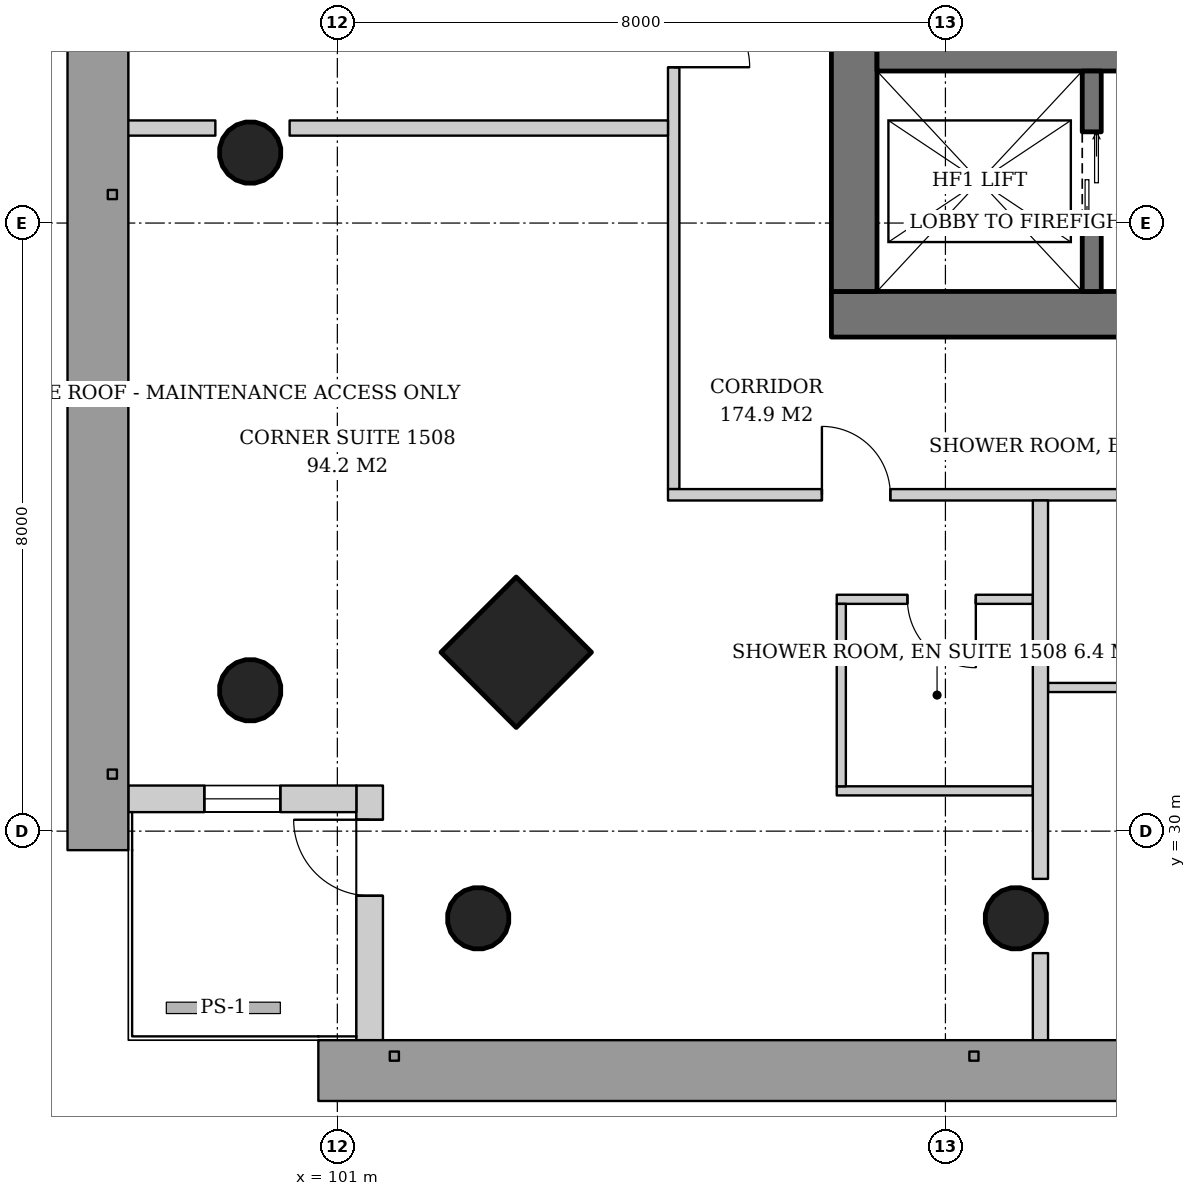
"""IFC4 building model, lengths in metres.
Left out: names, types, materials, properties, quantities, classifications, styles, units other than length and angle.
Written with IfcOpenShell. Run it as: python <this file> out.ifc"""

import sys

from ifc_helpers import new_model, si_unit, direction, frame, frame_2d, origin, origin_2d, place, context, subcontext, project, spatial, rectangle, hollow_circle, extrude, element, fill, save


model = new_model("IFC4")
c1 = context("Model", 3, precision=1e-05, world=origin(), true_north=direction((0.0, 1.0)))
c2 = subcontext(c1, "Body", "Model", "MODEL_VIEW")
j1 = project(units=[si_unit("LENGTHUNIT", "METRE"), si_unit("PLANEANGLEUNIT", "RADIAN")], contexts=[c1])
p1 = place(None, origin())
s1 = spatial("IfcSite", under=j1, at=p1, CompositionType="ELEMENT")
p2 = place(p1, origin())
s2 = spatial("IfcBuilding", under=s1, at=p2, CompositionType="ELEMENT")
p3 = place(p2, frame((0.0, 0.0, 62.8)))
s3 = spatial("IfcBuildingStorey", under=s2, at=p3, CompositionType="ELEMENT", Elevation=62.8)
p4 = place(p3, frame((103.302, 32.302, 0.0), z_axis=(0.043029647111, 0.043029647111, 0.998146732169), x_axis=(-0.707106781187, 0.707106781187, 0.0)))
e1 = element("IfcColumn", 1, at=p4, inside=s3, PredefinedType="COLUMN", context=c2, shape_type="SweptSolid", body=[
    extrude(rectangle(XDim=1.4, YDim=1.4, at=origin_2d()), origin(), (0.0, 0.0, 1.0), 3.807),
])
p5 = place(p3, frame((99.802, 31.802, 0.0), z_axis=(0.043029647111, 0.043029647111, 0.998146732169), x_axis=(-0.707106781187, 0.707106781187, 0.0)))
e2 = element("IfcColumn", 2, at=p5, inside=s3, PredefinedType="COLUMN", context=c2, shape_type="SweptSolid", body=[
    extrude(hollow_circle(Radius=0.406, WallThickness=0.03, at=origin_2d()), origin(), (0.0, 0.0, 1.0), 3.807),
])
p6 = place(p3, frame((99.802, 38.901, 0.0), z_axis=(0.043059584825, 0.021497706284, 0.998841188968), x_axis=(-0.446680166538, 0.894693706707, 0.0)))
e3 = element("IfcColumn", 3, at=p6, inside=s3, PredefinedType="COLUMN", context=c2, shape_type="SweptSolid", body=[
    extrude(hollow_circle(Radius=0.406, WallThickness=0.03, at=origin_2d()), origin(), (0.0, 0.0, 1.0), 3.804),
])
p7 = place(p3, frame((102.802, 28.802, 0.0), z_axis=(0.043029647111, 0.043029647111, 0.998146732169), x_axis=(-0.707106781187, 0.707106781187, 0.0)))
e4 = element("IfcColumn", 4, at=p7, inside=s3, PredefinedType="COLUMN", context=c2, shape_type="SweptSolid", body=[
    extrude(hollow_circle(Radius=0.406, WallThickness=0.03, at=origin_2d()), origin(), (0.0, 0.0, 1.0), 3.807),
])
p8 = place(p3, frame((109.901, 28.802, 0.0), z_axis=(0.021497706284, 0.043059584825, 0.998841188968), x_axis=(-0.894693706707, 0.446680166538, 0.0)))
e5 = element("IfcColumn", 5, at=p8, inside=s3, PredefinedType="COLUMN", context=c2, shape_type="SweptSolid", body=[
    extrude(hollow_circle(Radius=0.406, WallThickness=0.03, at=origin_2d()), origin(), (0.0, 0.0, 1.0), 3.804),
])
p9 = place(p3, frame((107.5, 36.8, 0.0), z_axis=(0.0, 0.0, 1.0), x_axis=(1.0, 0.0, 0.0)))
e6 = element("IfcWall", 6, at=p9, inside=s3, PredefinedType="SHEAR", context=c2, shape_type="SweptSolid", body=[
    extrude(rectangle(XDim=19.0, YDim=0.6, at=frame_2d((9.5, 0.0))), origin(), (0.0, 0.0, 1.0), 3.8),
])
p10 = place(p9, frame((3.9, 0.0, 0.0)))
e7 = element("IfcOpeningElement", 7, at=p10, cuts=e6, PredefinedType="OPENING", context=c2, shape_type="SweptSolid", body=[
    extrude(rectangle(XDim=1.0, YDim=2.1, at=frame_2d((0.5, 1.05))), frame((0.0, 0.31, 0.0), z_axis=(0.0, -1.0, 0.0), x_axis=(1.0, 0.0, 0.0)), (0.0, 0.0, 1.0), 0.62),
])
p11 = place(p9, frame((15.615, 0.0, 0.0)))
e8 = element("IfcOpeningElement", 8, at=p11, cuts=e6, PredefinedType="OPENING", context=c2, shape_type="SweptSolid", body=[
    extrude(rectangle(XDim=1.0, YDim=2.1, at=frame_2d((0.5, 1.05))), frame((0.0, 0.31, 0.0), z_axis=(0.0, -1.0, 0.0), x_axis=(1.0, 0.0, 0.0)), (0.0, 0.0, 1.0), 0.62),
])
p12 = place(p3, frame((107.8, 37.1, 0.0), z_axis=(0.0, 0.0, 1.0), x_axis=(0.0, 1.0, 0.0)))
e9 = element("IfcWall", 9, at=p12, inside=s3, PredefinedType="SHEAR", context=c2, shape_type="SweptSolid", body=[
    extrude(rectangle(XDim=17.8, YDim=0.6, at=frame_2d((8.9, 0.0))), origin(), (0.0, 0.0, 1.0), 3.8),
])
p13 = place(p12, frame((8.0, 0.0, 0.0)))
e10 = element("IfcOpeningElement", 10, at=p13, cuts=e9, PredefinedType="OPENING", context=c2, shape_type="SweptSolid", body=[
    extrude(rectangle(XDim=1.8, YDim=2.4, at=frame_2d((0.9, 1.2))), frame((0.0, 0.31, 0.0), z_axis=(0.0, -1.0, 0.0), x_axis=(1.0, 0.0, 0.0)), (0.0, 0.0, 1.0), 0.62),
])
p14 = place(p3, frame((108.1, 40.2, 0.0), z_axis=(0.0, 0.0, 1.0), x_axis=(1.0, 0.0, 0.0)))
e11 = element("IfcWall", 11, at=p14, inside=s3, PredefinedType="SHEAR", context=c2, shape_type="SweptSolid", body=[
    extrude(rectangle(XDim=17.8, YDim=0.4, at=frame_2d((8.9, 0.0))), origin(), (0.0, 0.0, 1.0), 3.8),
])
p15 = place(p3, frame((101.425, 27.25, 0.0), z_axis=(0.0, 0.0, 1.0), x_axis=(0.0, 1.0, 0.0)))
e12 = element("IfcWall", 12, at=p15, inside=s3, PredefinedType="SOLIDWALL", context=c2, shape_type="SweptSolid", body=[
    extrude(rectangle(XDim=3.35, YDim=0.35, at=frame_2d((1.675, 0.0))), origin(), (0.0, 0.0, 1.0), 3.6),
])
p16 = place(p15, frame((1.9, 0.0, 0.0)))
e13 = element("IfcOpeningElement", 13, at=p16, cuts=e12, PredefinedType="OPENING", context=c2, shape_type="SweptSolid", body=[
    extrude(rectangle(XDim=1.0, YDim=2.4, at=frame_2d((0.5, 1.2))), frame((0.0, 0.185, 0.0), z_axis=(0.0, -1.0, 0.0), x_axis=(1.0, 0.0, 0.0)), (0.0, 0.0, 1.0), 0.37),
])
p17 = place(p3, frame((101.25, 30.425, 0.0), z_axis=(0.0, 0.0, 1.0), x_axis=(-1.0, 0.0, 0.0)))
e14 = element("IfcWall", 14, at=p17, inside=s3, PredefinedType="SOLIDWALL", context=c2, shape_type="SweptSolid", body=[
    extrude(rectangle(XDim=3.0, YDim=0.35, at=frame_2d((1.5, 0.0))), origin(), (0.0, 0.0, 1.0), 3.6),
])
p18 = place(p17, frame((1.0, 0.0, 0.9)))
e15 = element("IfcOpeningElement", 15, at=p18, cuts=e14, PredefinedType="OPENING", context=c2, shape_type="SweptSolid", body=[
    extrude(rectangle(XDim=1.0, YDim=2.4, at=frame_2d((0.5, 1.2))), frame((0.0, 0.185, 0.0), z_axis=(0.0, -1.0, 0.0), x_axis=(1.0, 0.0, 0.0)), (0.0, 0.0, 1.0), 0.37),
])
p19 = place(p3, frame((110.925, 37.1, 0.0), z_axis=(0.0, 0.0, 1.0), x_axis=(0.0, 1.0, 0.0)))
e16 = element("IfcWall", 16, at=p19, inside=s3, PredefinedType="SHEAR", context=c2, shape_type="SweptSolid", body=[
    extrude(rectangle(XDim=2.9, YDim=0.25, at=frame_2d((1.45, 0.0))), origin(), (0.0, 0.0, 1.0), 3.8),
])
p20 = place(p19, frame((0.8, 0.0, 0.0)))
e17 = element("IfcOpeningElement", 17, at=p20, cuts=e16, PredefinedType="OPENING", context=c2, shape_type="SweptSolid", body=[
    extrude(rectangle(XDim=1.3, YDim=2.2, at=frame_2d((0.65, 1.1))), frame((0.0, 0.135, 0.0), z_axis=(0.0, -1.0, 0.0), x_axis=(1.0, 0.0, 0.0)), (0.0, 0.0, 1.0), 0.27),
])
p21 = place(p3, frame((105.425, 57.65, 0.0), z_axis=(0.0, 0.0, 1.0), x_axis=(0.0, -1.0, 0.0)))
e18 = element("IfcWall", 18, at=p21, inside=s3, PredefinedType="PARTITIONING", context=c2, shape_type="SweptSolid", body=[
    extrude(rectangle(XDim=23.15, YDim=0.15, at=frame_2d((11.575, 0.0))), origin(), (0.0, 0.0, 1.0), 2.8),
])
p22 = place(p21, frame((1.975, 0.0, 0.0)))
e19 = element("IfcOpeningElement", 19, at=p22, cuts=e18, PredefinedType="OPENING", context=c2, shape_type="SweptSolid", body=[
    extrude(rectangle(XDim=1.0, YDim=2.1, at=frame_2d((0.5, 1.05))), frame((0.0, 0.085, 0.0), z_axis=(0.0, -1.0, 0.0), x_axis=(1.0, 0.0, 0.0)), (0.0, 0.0, 1.0), 0.17),
])
p23 = place(p21, frame((7.65, 0.0, 0.0)))
e20 = element("IfcOpeningElement", 20, at=p23, cuts=e18, PredefinedType="OPENING", context=c2, shape_type="SweptSolid", body=[
    extrude(rectangle(XDim=0.9, YDim=2.1, at=frame_2d((0.45, 1.05))), frame((0.0, 0.085, 0.0), z_axis=(0.0, -1.0, 0.0), x_axis=(1.0, 0.0, 0.0)), (0.0, 0.0, 1.0), 0.17),
])
p24 = place(p21, frame((16.6, 0.0, 0.0)))
e21 = element("IfcOpeningElement", 21, at=p24, cuts=e18, PredefinedType="OPENING", context=c2, shape_type="SweptSolid", body=[
    extrude(rectangle(XDim=1.0, YDim=2.1, at=frame_2d((0.5, 1.05))), frame((0.0, 0.085, 0.0), z_axis=(0.0, -1.0, 0.0), x_axis=(1.0, 0.0, 0.0)), (0.0, 0.0, 1.0), 0.17),
])
p25 = place(p3, frame((105.35, 39.25, 0.0), z_axis=(0.0, 0.0, 1.0), x_axis=(-1.0, 0.0, 0.0)))
e22 = element("IfcWall", 22, at=p25, inside=s3, PredefinedType="PARTITIONING", context=c2, shape_type="SweptSolid", body=[
    extrude(rectangle(XDim=4.978, YDim=0.2, at=frame_2d((2.489, 0.0))), origin(), (0.0, 0.0, 1.0), 3.6),
])
p26 = place(p3, frame((99.395, 39.25, 0.0), z_axis=(0.0, 0.0, 1.0), x_axis=(-1.0, 0.0, 0.0)))
e23 = element("IfcWall", 23, at=p26, inside=s3, PredefinedType="PARTITIONING", context=c2, shape_type="SweptSolid", body=[
    extrude(rectangle(XDim=1.185, YDim=0.2, at=frame_2d((0.593, 0.0))), origin(), (0.0, 0.0, 1.0), 3.6),
])
p27 = place(p3, frame((110.15, 33.05, 0.0), z_axis=(0.0, 0.0, 1.0), x_axis=(-1.0, 0.0, 0.0)))
e24 = element("IfcWall", 24, at=p27, inside=s3, PredefinedType="PARTITIONING", context=c2, shape_type="SweptSolid", body=[
    extrude(rectangle(XDim=2.58, YDim=0.12, at=frame_2d((1.29, 0.0))), origin(), (0.0, 0.0, 1.0), 2.8),
])
p28 = place(p27, frame((0.75, 0.0, 0.0)))
e25 = element("IfcOpeningElement", 25, at=p28, cuts=e24, PredefinedType="OPENING", context=c2, shape_type="SweptSolid", body=[
    extrude(rectangle(XDim=0.9, YDim=2.1, at=frame_2d((0.45, 1.05))), frame((0.0, 0.07, 0.0), z_axis=(0.0, -1.0, 0.0), x_axis=(1.0, 0.0, 0.0)), (0.0, 0.0, 1.0), 0.14),
])
p29 = place(p3, frame((110.15, 30.53, 0.0), z_axis=(0.0, 0.0, 1.0), x_axis=(-1.0, 0.0, 0.0)))
e26 = element("IfcWall", 26, at=p29, inside=s3, PredefinedType="PARTITIONING", context=c2, shape_type="SweptSolid", body=[
    extrude(rectangle(XDim=2.58, YDim=0.12, at=frame_2d((1.29, 0.0))), origin(), (0.0, 0.0, 1.0), 2.8),
])
p30 = place(p3, frame((107.63, 32.99, 0.0), z_axis=(0.0, 0.0, 1.0), x_axis=(0.0, -1.0, 0.0)))
e27 = element("IfcWall", 27, at=p30, inside=s3, PredefinedType="PARTITIONING", context=c2, shape_type="SweptSolid", body=[
    extrude(rectangle(XDim=2.4, YDim=0.12, at=frame_2d((1.2, 0.0))), origin(), (0.0, 0.0, 1.0), 2.8),
])
p31 = place(p3, frame((110.35, 31.89, 0.0), z_axis=(0.0, 0.0, 1.0), x_axis=(1.0, 0.0, 0.0)))
e28 = element("IfcWall", 28, at=p31, inside=s3, PredefinedType="PARTITIONING", context=c2, shape_type="SweptSolid", body=[
    extrude(rectangle(XDim=2.42, YDim=0.12, at=frame_2d((1.21, 0.0))), origin(), (0.0, 0.0, 1.0), 2.847),
])
p32 = place(p3, frame((105.35, 34.425, 0.0), z_axis=(0.0, 0.0, 1.0), x_axis=(1.0, 0.0, 0.0)))
e29 = element("IfcWall", 29, at=p32, inside=s3, PredefinedType="PARTITIONING", context=c2, shape_type="SweptSolid", body=[
    extrude(rectangle(XDim=23.15, YDim=0.15, at=frame_2d((11.575, 0.0))), origin(), (0.0, 0.0, 1.0), 2.8),
])
p33 = place(p32, frame((2.025, 0.0, 0.0)))
e30 = element("IfcOpeningElement", 30, at=p33, cuts=e29, PredefinedType="OPENING", context=c2, shape_type="SweptSolid", body=[
    extrude(rectangle(XDim=0.9, YDim=2.1, at=frame_2d((0.45, 1.05))), frame((0.0, 0.085, 0.0), z_axis=(0.0, -1.0, 0.0), x_axis=(1.0, 0.0, 0.0)), (0.0, 0.0, 1.0), 0.17),
])
p34 = place(p32, frame((7.65, 0.0, 0.0)))
e31 = element("IfcOpeningElement", 31, at=p34, cuts=e29, PredefinedType="OPENING", context=c2, shape_type="SweptSolid", body=[
    extrude(rectangle(XDim=0.9, YDim=2.1, at=frame_2d((0.45, 1.05))), frame((0.0, 0.085, 0.0), z_axis=(0.0, -1.0, 0.0), x_axis=(1.0, 0.0, 0.0)), (0.0, 0.0, 1.0), 0.17),
])
p35 = place(p32, frame((14.75, 0.0, 0.0)))
e32 = element("IfcOpeningElement", 32, at=p35, cuts=e29, PredefinedType="OPENING", context=c2, shape_type="SweptSolid", body=[
    extrude(rectangle(XDim=0.9, YDim=2.1, at=frame_2d((0.45, 1.05))), frame((0.0, 0.085, 0.0), z_axis=(0.0, -1.0, 0.0), x_axis=(1.0, 0.0, 0.0)), (0.0, 0.0, 1.0), 0.17),
])
p36 = place(p3, frame((110.25, 34.35, 0.0), z_axis=(0.0, 0.0, 1.0), x_axis=(0.0, -1.0, 0.0)))
e33 = element("IfcWall", 33, at=p36, inside=s3, PredefinedType="PARTITIONING", context=c2, shape_type="SweptSolid", body=[
    extrude(rectangle(XDim=4.978, YDim=0.2, at=frame_2d((2.489, 0.0))), origin(), (0.0, 0.0, 1.0), 3.6),
])
p37 = place(p3, frame((110.25, 28.395, 0.0), z_axis=(0.0, 0.0, 1.0), x_axis=(0.0, -1.0, 0.0)))
e34 = element("IfcWall", 34, at=p37, inside=s3, PredefinedType="PARTITIONING", context=c2, shape_type="SweptSolid", body=[
    extrude(rectangle(XDim=1.185, YDim=0.2, at=frame_2d((0.593, 0.0))), origin(), (0.0, 0.0, 1.0), 3.6),
])
p38 = place(p16, origin())
e35 = element("IfcDoor", 35, at=p38, inside=s3, OperationType="SINGLE_SWING_RIGHT", PredefinedType="DOOR", context=c2, shape_type="SweptSolid", body=[
    extrude(rectangle(XDim=1.0, YDim=2.4, at=frame_2d((0.5, 1.2))), frame((0.0, 0.025, 0.0), z_axis=(0.0, -1.0, 0.0), x_axis=(1.0, 0.0, 0.0)), (0.0, 0.0, 1.0), 0.05),
])
fill(e13, e35)
p39 = place(p18, origin())
e36 = element("IfcWindow", 36, at=p39, inside=s3, PartitioningType="SINGLE_PANEL", PredefinedType="WINDOW", context=c2, shape_type="SweptSolid", body=[
    extrude(rectangle(XDim=1.0, YDim=2.4, at=frame_2d((0.5, 1.2))), frame((0.0, 0.03, 0.0), z_axis=(0.0, -1.0, 0.0), x_axis=(1.0, 0.0, 0.0)), (0.0, 0.0, 1.0), 0.06),
])
fill(e15, e36)
p40 = place(p20, origin())
e37 = element("IfcDoor", 37, at=p40, inside=s3, OperationType="DOUBLE_DOOR_SLIDING", PredefinedType="DOOR", context=c2, shape_type="SweptSolid", body=[
    extrude(rectangle(XDim=1.3, YDim=2.2, at=frame_2d((0.65, 1.1))), frame((0.0, 0.025, 0.0), z_axis=(0.0, -1.0, 0.0), x_axis=(1.0, 0.0, 0.0)), (0.0, 0.0, 1.0), 0.05),
])
fill(e17, e37)
p41 = place(p24, origin())
e38 = element("IfcDoor", 38, at=p41, inside=s3, OperationType="SINGLE_SWING_RIGHT", PredefinedType="DOOR", context=c2, shape_type="SweptSolid", body=[
    extrude(rectangle(XDim=1.0, YDim=2.1, at=frame_2d((0.5, 1.05))), frame((0.0, 0.025, 0.0), z_axis=(0.0, -1.0, 0.0), x_axis=(1.0, 0.0, 0.0)), (0.0, 0.0, 1.0), 0.05),
])
fill(e21, e38)
p42 = place(p28, origin())
e39 = element("IfcDoor", 39, at=p42, inside=s3, OperationType="SINGLE_SWING_LEFT", PredefinedType="DOOR", context=c2, shape_type="SweptSolid", body=[
    extrude(rectangle(XDim=0.9, YDim=2.1, at=frame_2d((0.45, 1.05))), frame((0.0, 0.025, 0.0), z_axis=(0.0, -1.0, 0.0), x_axis=(1.0, 0.0, 0.0)), (0.0, 0.0, 1.0), 0.05),
])
fill(e25, e39)
p43 = place(p33, origin())
e40 = element("IfcDoor", 40, at=p43, inside=s3, OperationType="SINGLE_SWING_LEFT", PredefinedType="DOOR", context=c2, shape_type="SweptSolid", body=[
    extrude(rectangle(XDim=0.9, YDim=2.1, at=frame_2d((0.45, 1.05))), frame((0.0, 0.025, 0.0), z_axis=(0.0, -1.0, 0.0), x_axis=(1.0, 0.0, 0.0)), (0.0, 0.0, 1.0), 0.05),
])
fill(e30, e40)
save(model, sys.argv[1])
